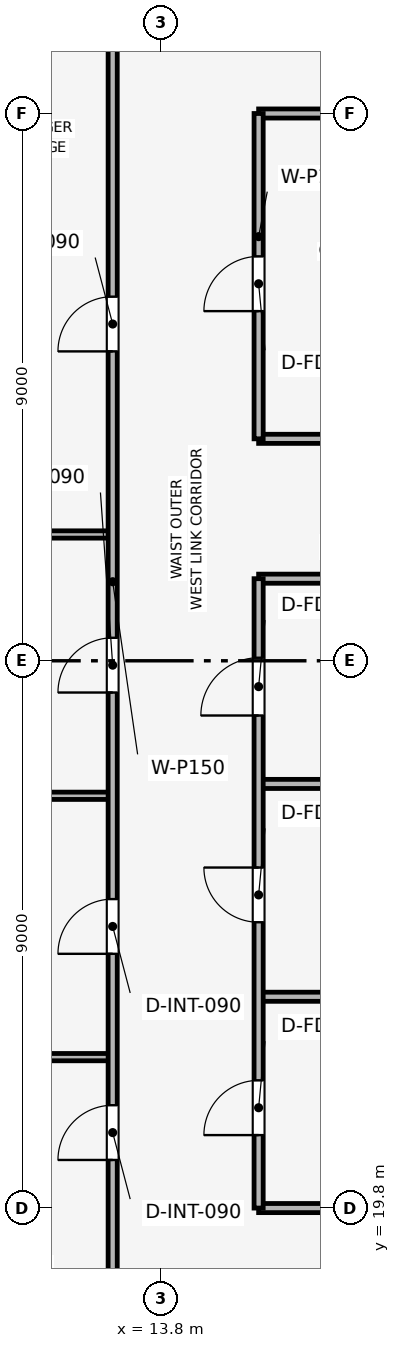
"""IFC4 building model, lengths in metres.
Left out: names, types, materials, properties, quantities, classifications, styles, units other than length and angle.
Written with IfcOpenShell. Run it as: python <this file> out.ifc"""

import sys

from ifc_helpers import new_model, si_unit, direction, frame, frame_2d, origin, place, context, subcontext, project, spatial, rectangle, extrude, element, fill, save


model = new_model("IFC4")
c1 = context("Model", 3, precision=1e-05, world=origin(), true_north=direction((0.0, 1.0)))
c2 = subcontext(c1, "Body", "Model", "MODEL_VIEW")
j1 = project(units=[si_unit("LENGTHUNIT", "METRE"), si_unit("PLANEANGLEUNIT", "RADIAN")], contexts=[c1])
p1 = place(None, origin())
s1 = spatial("IfcSite", under=j1, at=p1, CompositionType="ELEMENT")
p2 = place(p1, origin())
s2 = spatial("IfcBuilding", under=s1, at=p2, CompositionType="ELEMENT")
p3 = place(p2, frame((0.0, 0.0, 153.3)))
s3 = spatial("IfcBuildingStorey", under=s2, at=p3, CompositionType="ELEMENT", Elevation=153.3)
p4 = place(p3, frame((15.4, 19.8, 0.0), z_axis=(0.0, 0.0, 1.0), x_axis=(1.0, 0.0, 0.0)))
e1 = element("IfcWall", 1, at=p4, inside=s3, PredefinedType="PARTITIONING", context=c2, shape_type="SweptSolid", body=[
    extrude(rectangle(XDim=4.4, YDim=0.15, at=frame_2d((2.2, 0.0))), origin(), (0.0, 0.0, 1.0), 3.03),
])
for number, where, z_axis, x_axis in (
    (2, (15.4, 23.275, 0.0), (0.0, 0.0, 1.0), (1.0, 0.0, 0.0)),
    (3, (15.4, 26.775, 0.0), (0.0, 0.0, 1.0), (1.0, 0.0, 0.0)),
    (4, (15.4, 30.15, 0.0), (0.0, 0.0, 1.0), (1.0, 0.0, 0.0)),
    (5, (15.4, 32.45, 0.0), (0.0, 0.0, 1.0), (1.0, 0.0, 0.0)),
):
    element("IfcWall", number, at=place(p3, frame(where, z_axis=z_axis, x_axis=x_axis)), inside=s3, PredefinedType="PARTITIONING", context=c2, shape_type="SweptSolid", body=[
        extrude(rectangle(XDim=4.4, YDim=0.15, at=frame_2d((2.2, 0.0))), origin(), (0.0, 0.0, 1.0), 3.495),
    ])
p5 = place(p3, frame((15.4, 37.8, 0.0), z_axis=(0.0, 0.0, 1.0), x_axis=(1.0, 0.0, 0.0)))
e6 = element("IfcWall", 6, at=p5, inside=s3, PredefinedType="PARTITIONING", context=c2, shape_type="SweptSolid", body=[
    extrude(rectangle(XDim=4.4, YDim=0.15, at=frame_2d((2.2, 0.0))), origin(), (0.0, 0.0, 1.0), 3.03),
])
p6 = place(p3, frame((15.4, 19.8, 0.0), z_axis=(0.0, 0.0, 1.0), x_axis=(0.0, 1.0, 0.0)))
e7 = element("IfcWall", 7, at=p6, inside=s3, PredefinedType="PARTITIONING", context=c2, shape_type="SweptSolid", body=[
    extrude(rectangle(XDim=10.35, YDim=0.15, at=frame_2d((5.175, 0.0))), origin(), (0.0, 0.0, 1.0), 3.03),
])
p7 = place(p6, frame((1.2, 0.0, 0.0)))
e8 = element("IfcOpeningElement", 8, at=p7, cuts=e7, PredefinedType="OPENING", context=c2, shape_type="SweptSolid", body=[
    extrude(rectangle(XDim=0.9, YDim=2.1, at=frame_2d((0.45, 1.05))), frame((0.0, 0.085, 0.0), z_axis=(0.0, -1.0, 0.0), x_axis=(1.0, 0.0, 0.0)), (0.0, 0.0, 1.0), 0.17),
])
p8 = place(p6, frame((4.7, 0.0, 0.0)))
e9 = element("IfcOpeningElement", 9, at=p8, cuts=e7, PredefinedType="OPENING", context=c2, shape_type="SweptSolid", body=[
    extrude(rectangle(XDim=0.9, YDim=2.1, at=frame_2d((0.45, 1.05))), frame((0.0, 0.085, 0.0), z_axis=(0.0, -1.0, 0.0), x_axis=(1.0, 0.0, 0.0)), (0.0, 0.0, 1.0), 0.17),
])
p9 = place(p6, frame((8.1, 0.0, 0.0)))
e10 = element("IfcOpeningElement", 10, at=p9, cuts=e7, PredefinedType="OPENING", context=c2, shape_type="SweptSolid", body=[
    extrude(rectangle(XDim=0.95, YDim=2.1, at=frame_2d((0.475, 1.05))), frame((0.0, 0.085, 0.0), z_axis=(0.0, -1.0, 0.0), x_axis=(1.0, 0.0, 0.0)), (0.0, 0.0, 1.0), 0.17),
])
p10 = place(p3, frame((15.4, 32.45, 0.0), z_axis=(0.0, 0.0, 1.0), x_axis=(0.0, 1.0, 0.0)))
e11 = element("IfcWall", 11, at=p10, inside=s3, PredefinedType="PARTITIONING", context=c2, shape_type="SweptSolid", body=[
    extrude(rectangle(XDim=5.35, YDim=0.15, at=frame_2d((2.675, 0.0))), origin(), (0.0, 0.0, 1.0), 3.03),
])
p11 = place(p10, frame((2.1, 0.0, 0.0)))
e12 = element("IfcOpeningElement", 12, at=p11, cuts=e11, PredefinedType="OPENING", context=c2, shape_type="SweptSolid", body=[
    extrude(rectangle(XDim=0.9, YDim=2.1, at=frame_2d((0.45, 1.05))), frame((0.0, 0.085, 0.0), z_axis=(0.0, -1.0, 0.0), x_axis=(1.0, 0.0, 0.0)), (0.0, 0.0, 1.0), 0.17),
])
for number, where, z_axis, x_axis in (
    (13, (4.63, 22.282, 0.0), (0.0, 0.0, 1.0), (1.0, 0.0, 0.0)),
    (14, (4.63, 26.58, 0.0), (0.0, 0.0, 1.0), (1.0, 0.0, 0.0)),
    (15, (4.63, 30.877, 0.0), (0.0, 0.0, 1.0), (1.0, 0.0, 0.0)),
):
    element("IfcWall", number, at=place(p3, frame(where, z_axis=z_axis, x_axis=x_axis)), inside=s3, PredefinedType="PARTITIONING", context=c2, shape_type="SweptSolid", body=[
        extrude(rectangle(XDim=8.37, YDim=0.12, at=frame_2d((4.185, 0.0))), origin(), (0.0, 0.0, 1.0), 2.98),
    ])
p12 = place(p3, frame((13.0, 17.4, 0.0), z_axis=(0.0, 0.0, 1.0), x_axis=(0.0, 1.0, 0.0)))
e16 = element("IfcWall", 16, at=p12, inside=s3, PredefinedType="PARTITIONING", context=c2, shape_type="SweptSolid", body=[
    extrude(rectangle(XDim=22.8, YDim=0.15, at=frame_2d((11.4, 0.0))), origin(), (0.0, 0.0, 1.0), 3.03),
])
p13 = place(p12, frame((3.191, 0.0, 0.0)))
e17 = element("IfcOpeningElement", 17, at=p13, cuts=e16, PredefinedType="OPENING", context=c2, shape_type="SweptSolid", body=[
    extrude(rectangle(XDim=0.9, YDim=2.1, at=frame_2d((0.45, 1.05))), frame((0.0, 0.085, 0.0), z_axis=(0.0, -1.0, 0.0), x_axis=(1.0, 0.0, 0.0)), (0.0, 0.0, 1.0), 0.17),
])
p14 = place(p12, frame((6.581, 0.0, 0.0)))
e18 = element("IfcOpeningElement", 18, at=p14, cuts=e16, PredefinedType="OPENING", context=c2, shape_type="SweptSolid", body=[
    extrude(rectangle(XDim=0.9, YDim=2.1, at=frame_2d((0.45, 1.05))), frame((0.0, 0.085, 0.0), z_axis=(0.0, -1.0, 0.0), x_axis=(1.0, 0.0, 0.0)), (0.0, 0.0, 1.0), 0.17),
])
p15 = place(p12, frame((10.878, 0.0, 0.0)))
e19 = element("IfcOpeningElement", 19, at=p15, cuts=e16, PredefinedType="OPENING", context=c2, shape_type="SweptSolid", body=[
    extrude(rectangle(XDim=0.9, YDim=2.1, at=frame_2d((0.45, 1.05))), frame((0.0, 0.085, 0.0), z_axis=(0.0, -1.0, 0.0), x_axis=(1.0, 0.0, 0.0)), (0.0, 0.0, 1.0), 0.17),
])
p16 = place(p12, frame((16.488, 0.0, 0.0)))
e20 = element("IfcOpeningElement", 20, at=p16, cuts=e16, PredefinedType="OPENING", context=c2, shape_type="SweptSolid", body=[
    extrude(rectangle(XDim=0.9, YDim=2.1, at=frame_2d((0.45, 1.05))), frame((0.0, 0.085, 0.0), z_axis=(0.0, -1.0, 0.0), x_axis=(1.0, 0.0, 0.0)), (0.0, 0.0, 1.0), 0.17),
])
p17 = place(p7, origin())
e21 = element("IfcDoor", 21, at=p17, inside=s3, OperationType="SINGLE_SWING_LEFT", PredefinedType="DOOR", context=c2, shape_type="SweptSolid", body=[
    extrude(rectangle(XDim=0.9, YDim=2.1, at=frame_2d((0.45, 1.05))), frame((0.0, 0.025, 0.0), z_axis=(0.0, -1.0, 0.0), x_axis=(1.0, 0.0, 0.0)), (0.0, 0.0, 1.0), 0.05),
])
fill(e8, e21)
p18 = place(p8, origin())
e22 = element("IfcDoor", 22, at=p18, inside=s3, OperationType="SINGLE_SWING_RIGHT", PredefinedType="DOOR", context=c2, shape_type="SweptSolid", body=[
    extrude(rectangle(XDim=0.9, YDim=2.1, at=frame_2d((0.45, 1.05))), frame((0.0, 0.025, 0.0), z_axis=(0.0, -1.0, 0.0), x_axis=(1.0, 0.0, 0.0)), (0.0, 0.0, 1.0), 0.05),
])
fill(e9, e22)
p19 = place(p9, origin())
e23 = element("IfcDoor", 23, at=p19, inside=s3, OperationType="SINGLE_SWING_LEFT", PredefinedType="DOOR", context=c2, shape_type="SweptSolid", body=[
    extrude(rectangle(XDim=0.95, YDim=2.1, at=frame_2d((0.475, 1.05))), frame((0.0, 0.025, 0.0), z_axis=(0.0, -1.0, 0.0), x_axis=(1.0, 0.0, 0.0)), (0.0, 0.0, 1.0), 0.05),
])
fill(e10, e23)
p20 = place(p11, origin())
e24 = element("IfcDoor", 24, at=p20, inside=s3, OperationType="SINGLE_SWING_LEFT", PredefinedType="DOOR", context=c2, shape_type="SweptSolid", body=[
    extrude(rectangle(XDim=0.9, YDim=2.1, at=frame_2d((0.45, 1.05))), frame((0.0, 0.025, 0.0), z_axis=(0.0, -1.0, 0.0), x_axis=(1.0, 0.0, 0.0)), (0.0, 0.0, 1.0), 0.05),
])
fill(e12, e24)
p21 = place(p13, origin())
e25 = element("IfcDoor", 25, at=p21, inside=s3, OperationType="SINGLE_SWING_LEFT", PredefinedType="DOOR", context=c2, shape_type="SweptSolid", body=[
    extrude(rectangle(XDim=0.9, YDim=2.1, at=frame_2d((0.45, 1.05))), frame((0.0, 0.025, 0.0), z_axis=(0.0, -1.0, 0.0), x_axis=(1.0, 0.0, 0.0)), (0.0, 0.0, 1.0), 0.05),
])
fill(e17, e25)
p22 = place(p14, origin())
e26 = element("IfcDoor", 26, at=p22, inside=s3, OperationType="SINGLE_SWING_LEFT", PredefinedType="DOOR", context=c2, shape_type="SweptSolid", body=[
    extrude(rectangle(XDim=0.9, YDim=2.1, at=frame_2d((0.45, 1.05))), frame((0.0, 0.025, 0.0), z_axis=(0.0, -1.0, 0.0), x_axis=(1.0, 0.0, 0.0)), (0.0, 0.0, 1.0), 0.05),
])
fill(e18, e26)
p23 = place(p15, origin())
e27 = element("IfcDoor", 27, at=p23, inside=s3, OperationType="SINGLE_SWING_LEFT", PredefinedType="DOOR", context=c2, shape_type="SweptSolid", body=[
    extrude(rectangle(XDim=0.9, YDim=2.1, at=frame_2d((0.45, 1.05))), frame((0.0, 0.025, 0.0), z_axis=(0.0, -1.0, 0.0), x_axis=(1.0, 0.0, 0.0)), (0.0, 0.0, 1.0), 0.05),
])
fill(e19, e27)
p24 = place(p16, origin())
e28 = element("IfcDoor", 28, at=p24, inside=s3, OperationType="SINGLE_SWING_LEFT", PredefinedType="DOOR", context=c2, shape_type="SweptSolid", body=[
    extrude(rectangle(XDim=0.9, YDim=2.1, at=frame_2d((0.45, 1.05))), frame((0.0, 0.025, 0.0), z_axis=(0.0, -1.0, 0.0), x_axis=(1.0, 0.0, 0.0)), (0.0, 0.0, 1.0), 0.05),
])
fill(e20, e28)
save(model, sys.argv[1])
